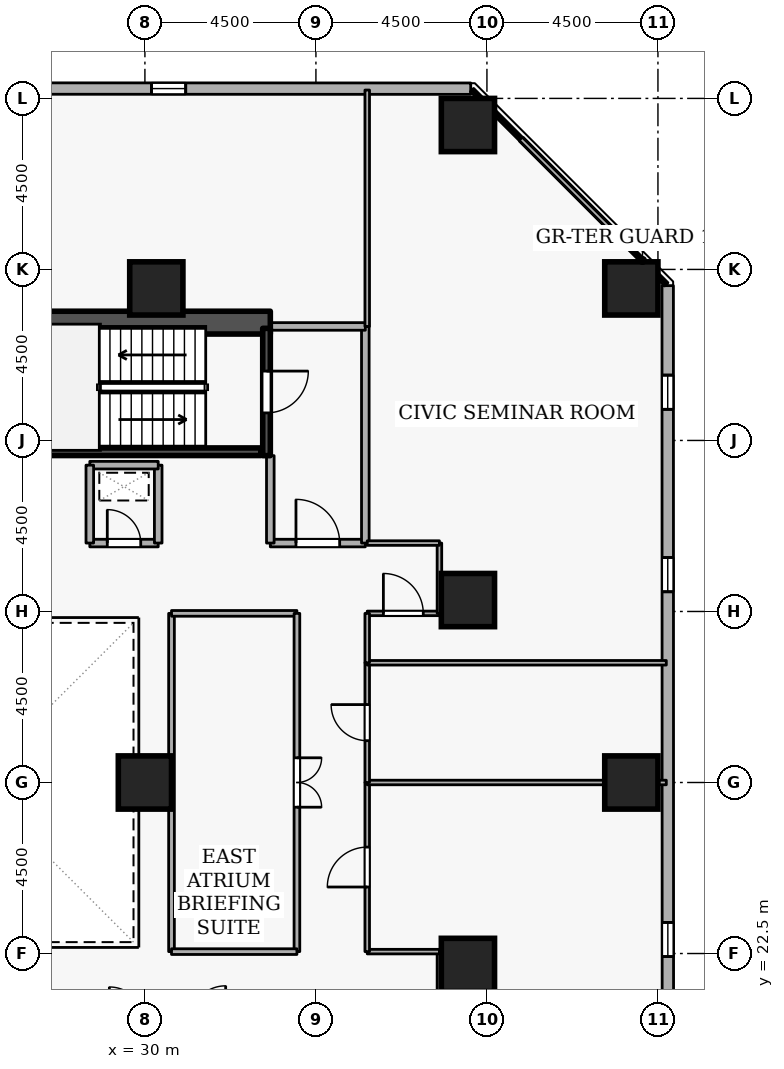
"""IFC4 building model, lengths in metres.
Left out: names, types, materials, properties, quantities, classifications, styles, units other than length and angle.
Written with IfcOpenShell. Run it as: python <this file> out.ifc"""

import sys

from ifc_helpers import new_model, si_unit, direction, frame, frame_2d, origin, origin_2d, place, context, subcontext, project, spatial, rectangle, extrude, element, fill, save


model = new_model("IFC4")
c1 = context("Model", 3, precision=1e-05, world=origin(), true_north=direction((0.0, 1.0)))
c2 = subcontext(c1, "Body", "Model", "MODEL_VIEW")
j1 = project(units=[si_unit("LENGTHUNIT", "METRE"), si_unit("PLANEANGLEUNIT", "RADIAN")], contexts=[c1])
p1 = place(None, origin())
s1 = spatial("IfcSite", under=j1, at=p1, CompositionType="ELEMENT")
p2 = place(p1, origin())
s2 = spatial("IfcBuilding", under=s1, at=p2, CompositionType="ELEMENT")
p3 = place(p2, frame((0.0, 0.0, 38.7)))
s3 = spatial("IfcBuildingStorey", under=s2, at=p3, CompositionType="ELEMENT", Elevation=38.7)
p4 = place(p3, frame((17.7, 39.1, 0.0), z_axis=(0.0, 0.0, 1.0), x_axis=(1.0, 0.0, 0.0)))
e1 = element("IfcWall", 1, at=p4, inside=s3, PredefinedType="SHEAR", context=c2, shape_type="SweptSolid", body=[
    extrude(rectangle(XDim=15.6, YDim=0.6, at=frame_2d((7.8, 0.0))), origin(), (0.0, 0.0, 1.0), 3.6),
])
for number, where, z_axis, x_axis in (
    (2, (42.8, 27.0, 0.0), (0.0, 0.0, 1.0), (1.0, 0.0, 0.0)),
    (3, (42.8, 40.0, 0.0), (0.0, 0.0, 1.0), (1.0, 0.0, 0.0)),
    (4, (38.5, 44.3, 0.0), (0.0, 0.0, 1.0), (1.0, 0.0, 0.0)),
    (5, (38.5, 22.2, 0.0), (0.0, 0.0, 1.0), (1.0, 0.0, 0.0)),
    (6, (38.5, 31.8, 0.0), (0.0, 0.0, 1.0), (1.0, 0.0, 0.0)),
    (7, (30.3, 40.0, 0.0), (0.0, 0.0, 1.0), (1.0, 0.0, 0.0)),
    (8, (30.0, 27.0, 0.0), (0.0, 0.0, 1.0), (1.0, 0.0, 0.0)),
):
    element("IfcColumn", number, at=place(p3, frame(where, z_axis=z_axis, x_axis=x_axis)), inside=s3, PredefinedType="COLUMN", context=c2, shape_type="SweptSolid", body=[
        extrude(rectangle(XDim=1.4, YDim=1.4, at=origin_2d()), origin(), (0.0, 0.0, 1.0), 3.6),
    ])
p5 = place(p3, frame((43.765, 5.319, 0.0), z_axis=(0.0, 0.0, 1.0), x_axis=(-0.000245864205, 0.999999969775, 0.0)))
e9 = element("IfcWall", 9, at=p5, inside=s3, PredefinedType="STANDARD", context=c2, shape_type="SweptSolid", body=[
    extrude(rectangle(XDim=34.755, YDim=0.3, at=frame_2d((17.377, 0.0))), origin(), (0.0, 0.0, 1.0), 2.7),
])
p6 = place(p5, frame((2.7, 0.0, 0.72)))
e10 = element("IfcOpeningElement", 10, at=p6, cuts=e9, PredefinedType="OPENING", context=c2, shape_type="SweptSolid", body=[
    extrude(rectangle(XDim=0.9, YDim=1.75, at=frame_2d((0.45, 0.875))), frame((0.0, 0.16, 0.0), z_axis=(0.0, -1.0, 0.0), x_axis=(1.0, 0.0, 0.0)), (0.0, 0.0, 1.0), 0.32),
])
p7 = place(p5, frame((12.3, 0.0, 0.72)))
e11 = element("IfcOpeningElement", 11, at=p7, cuts=e9, PredefinedType="OPENING", context=c2, shape_type="SweptSolid", body=[
    extrude(rectangle(XDim=0.9, YDim=1.75, at=frame_2d((0.45, 0.875))), frame((0.0, 0.16, 0.0), z_axis=(0.0, -1.0, 0.0), x_axis=(1.0, 0.0, 0.0)), (0.0, 0.0, 1.0), 0.32),
])
p8 = place(p5, frame((17.1, 0.0, 0.72)))
e12 = element("IfcOpeningElement", 12, at=p8, cuts=e9, PredefinedType="OPENING", context=c2, shape_type="SweptSolid", body=[
    extrude(rectangle(XDim=0.9, YDim=1.75, at=frame_2d((0.45, 0.875))), frame((0.0, 0.16, 0.0), z_axis=(0.0, -1.0, 0.0), x_axis=(1.0, 0.0, 0.0)), (0.0, 0.0, 1.0), 0.32),
])
p9 = place(p5, frame((26.7, 0.0, 0.72)))
e13 = element("IfcOpeningElement", 13, at=p9, cuts=e9, PredefinedType="OPENING", context=c2, shape_type="SweptSolid", body=[
    extrude(rectangle(XDim=0.9, YDim=1.75, at=frame_2d((0.45, 0.875))), frame((0.0, 0.16, 0.0), z_axis=(0.0, -1.0, 0.0), x_axis=(1.0, 0.0, 0.0)), (0.0, 0.0, 1.0), 0.32),
])
p10 = place(p5, frame((31.5, 0.0, 0.72)))
e14 = element("IfcOpeningElement", 14, at=p10, cuts=e9, PredefinedType="OPENING", context=c2, shape_type="SweptSolid", body=[
    extrude(rectangle(XDim=0.9, YDim=1.75, at=frame_2d((0.45, 0.875))), frame((0.0, 0.16, 0.0), z_axis=(0.0, -1.0, 0.0), x_axis=(1.0, 0.0, 0.0)), (0.0, 0.0, 1.0), 0.32),
])
p11 = place(p3, frame((38.573, 45.256, 0.0), z_axis=(0.0, 0.0, 1.0), x_axis=(-0.999999969775, 0.000245864205, 0.0)))
e15 = element("IfcWall", 15, at=p11, inside=s3, PredefinedType="STANDARD", context=c2, shape_type="SweptSolid", body=[
    extrude(rectangle(XDim=34.755, YDim=0.3, at=frame_2d((17.377, 0.0))), origin(), (0.0, 0.0, 1.0), 2.7),
])
p12 = place(p11, frame((7.5, 0.0, 0.72)))
e16 = element("IfcOpeningElement", 16, at=p12, cuts=e15, PredefinedType="OPENING", context=c2, shape_type="SweptSolid", body=[
    extrude(rectangle(XDim=0.9, YDim=1.75, at=frame_2d((0.45, 0.875))), frame((0.0, 0.16, 0.0), z_axis=(0.0, -1.0, 0.0), x_axis=(1.0, 0.0, 0.0)), (0.0, 0.0, 1.0), 0.32),
])
p13 = place(p11, frame((17.1, 0.0, 0.72)))
e17 = element("IfcOpeningElement", 17, at=p13, cuts=e15, PredefinedType="OPENING", context=c2, shape_type="SweptSolid", body=[
    extrude(rectangle(XDim=0.9, YDim=1.75, at=frame_2d((0.45, 0.875))), frame((0.0, 0.16, 0.0), z_axis=(0.0, -1.0, 0.0), x_axis=(1.0, 0.0, 0.0)), (0.0, 0.0, 1.0), 0.32),
])
p14 = place(p11, frame((21.9, 0.0, 0.72)))
e18 = element("IfcOpeningElement", 18, at=p14, cuts=e15, PredefinedType="OPENING", context=c2, shape_type="SweptSolid", body=[
    extrude(rectangle(XDim=0.9, YDim=1.75, at=frame_2d((0.45, 0.875))), frame((0.0, 0.16, 0.0), z_axis=(0.0, -1.0, 0.0), x_axis=(1.0, 0.0, 0.0)), (0.0, 0.0, 1.0), 0.32),
])
p15 = place(p11, frame((31.5, 0.0, 0.72)))
e19 = element("IfcOpeningElement", 19, at=p15, cuts=e15, PredefinedType="OPENING", context=c2, shape_type="SweptSolid", body=[
    extrude(rectangle(XDim=0.9, YDim=1.75, at=frame_2d((0.45, 0.875))), frame((0.0, 0.16, 0.0), z_axis=(0.0, -1.0, 0.0), x_axis=(1.0, 0.0, 0.0)), (0.0, 0.0, 1.0), 0.32),
])
p16 = place(p3, frame((33.2, 38.95, 0.0), z_axis=(0.0, 0.0, 1.0), x_axis=(0.0, -1.0, 0.0)))
e20 = element("IfcWall", 20, at=p16, inside=s3, PredefinedType="SHEAR", context=c2, shape_type="SweptSolid", body=[
    extrude(rectangle(XDim=3.35, YDim=0.2, at=frame_2d((1.675, 0.0))), origin(), (0.0, 0.0, 1.0), 3.6),
])
p17 = place(p16, frame((1.125, 0.0, 0.0)))
e21 = element("IfcOpeningElement", 21, at=p17, cuts=e20, PredefinedType="OPENING", context=c2, shape_type="SweptSolid", body=[
    extrude(rectangle(XDim=1.1, YDim=2.1, at=frame_2d((0.55, 1.05))), frame((0.0, 0.11, 0.0), z_axis=(0.0, -1.0, 0.0), x_axis=(1.0, 0.0, 0.0)), (0.0, 0.0, 1.0), 0.22),
])
p18 = place(p3, frame((25.95, 35.703, 0.0), z_axis=(0.0, 0.0, 1.0), x_axis=(1.0, 0.0, 0.0)))
e22 = element("IfcWall", 22, at=p18, inside=s3, PredefinedType="SHEAR", context=c2, shape_type="SweptSolid", body=[
    extrude(rectangle(XDim=7.1, YDim=0.2, at=frame_2d((3.55, 0.0))), origin(), (0.0, 0.0, 1.0), 3.6),
])
p19 = place(p3, frame((33.3, 33.3, 0.0), z_axis=(0.0, 0.0, 1.0), x_axis=(1.0, 0.0, 0.0)))
e23 = element("IfcWall", 23, at=p19, inside=s3, PredefinedType="STANDARD", context=c2, shape_type="SweptSolid", body=[
    extrude(rectangle(XDim=2.5, YDim=0.2, at=frame_2d((1.25, 0.0))), origin(), (0.0, 0.0, 1.0), 3.34),
])
p20 = place(p19, frame((0.675, 0.0, 0.0)))
e24 = element("IfcOpeningElement", 24, at=p20, cuts=e23, PredefinedType="OPENING", context=c2, shape_type="SweptSolid", body=[
    extrude(rectangle(XDim=1.15, YDim=2.1, at=frame_2d((0.575, 1.05))), frame((0.0, 0.11, 0.0), z_axis=(0.0, -1.0, 0.0), x_axis=(1.0, 0.0, 0.0)), (0.0, 0.0, 1.0), 0.22),
])
p21 = place(p3, frame((35.8, 33.3, 0.0), z_axis=(0.0, 0.0, 1.0), x_axis=(0.0, 1.0, 0.0)))
e25 = element("IfcWall", 25, at=p21, inside=s3, PredefinedType="STANDARD", context=c2, shape_type="SweptSolid", body=[
    extrude(rectangle(XDim=5.7, YDim=0.2, at=frame_2d((2.85, 0.0))), origin(), (0.0, 0.0, 1.0), 3.34),
])
p22 = place(p3, frame((35.8, 39.0, 0.0), z_axis=(0.0, 0.0, 1.0), x_axis=(-1.0, 0.0, 0.0)))
e26 = element("IfcWall", 26, at=p22, inside=s3, PredefinedType="STANDARD", context=c2, shape_type="SweptSolid", body=[
    extrude(rectangle(XDim=2.5, YDim=0.2, at=frame_2d((1.25, 0.0))), origin(), (0.0, 0.0, 1.0), 3.34),
])
p23 = place(p3, frame((33.3, 35.6, 0.0), z_axis=(0.0, 0.0, 1.0), x_axis=(0.0, -1.0, 0.0)))
e27 = element("IfcWall", 27, at=p23, inside=s3, PredefinedType="STANDARD", context=c2, shape_type="SweptSolid", body=[
    extrude(rectangle(XDim=2.3, YDim=0.2, at=frame_2d((1.15, 0.0))), origin(), (0.0, 0.0, 1.0), 2.545),
])
p24 = place(p3, frame((28.55, 33.3, 0.0), z_axis=(0.0, 0.0, 1.0), x_axis=(1.0, 0.0, 0.0)))
e28 = element("IfcWall", 28, at=p24, inside=s3, PredefinedType="STANDARD", context=c2, shape_type="SweptSolid", body=[
    extrude(rectangle(XDim=1.8, YDim=0.2, at=frame_2d((0.9, 0.0))), origin(), (0.0, 0.0, 1.0), 3.34),
])
p25 = place(p24, frame((0.46, 0.0, 0.0)))
e29 = element("IfcOpeningElement", 29, at=p25, cuts=e28, PredefinedType="OPENING", context=c2, shape_type="SweptSolid", body=[
    extrude(rectangle(XDim=0.88, YDim=2.04, at=frame_2d((0.44, 1.02))), frame((0.0, 0.11, 0.0), z_axis=(0.0, -1.0, 0.0), x_axis=(1.0, 0.0, 0.0)), (0.0, 0.0, 1.0), 0.22),
])
p26 = place(p3, frame((30.35, 33.3, 0.0), z_axis=(0.0, 0.0, 1.0), x_axis=(0.0, 1.0, 0.0)))
e30 = element("IfcWall", 30, at=p26, inside=s3, PredefinedType="STANDARD", context=c2, shape_type="SweptSolid", body=[
    extrude(rectangle(XDim=2.05, YDim=0.2, at=frame_2d((1.025, 0.0))), origin(), (0.0, 0.0, 1.0), 3.34),
])
p27 = place(p3, frame((30.35, 35.35, 0.0), z_axis=(0.0, 0.0, 1.0), x_axis=(-1.0, 0.0, 0.0)))
e31 = element("IfcWall", 31, at=p27, inside=s3, PredefinedType="STANDARD", context=c2, shape_type="SweptSolid", body=[
    extrude(rectangle(XDim=1.8, YDim=0.2, at=frame_2d((0.9, 0.0))), origin(), (0.0, 0.0, 1.0), 3.34),
])
p28 = place(p3, frame((28.55, 35.35, 0.0), z_axis=(0.0, 0.0, 1.0), x_axis=(0.0, -1.0, 0.0)))
e32 = element("IfcWall", 32, at=p28, inside=s3, PredefinedType="STANDARD", context=c2, shape_type="SweptSolid", body=[
    extrude(rectangle(XDim=2.05, YDim=0.2, at=frame_2d((1.025, 0.0))), origin(), (0.0, 0.0, 1.0), 3.34),
])
p29 = place(p3, frame((37.75, 20.7, 0.0), z_axis=(0.0, 0.0, 1.0), x_axis=(0.0, 1.0, 0.0)))
e33 = element("IfcWall", 33, at=p29, inside=s3, PredefinedType="PARTITIONING", context=c2, shape_type="SweptSolid", body=[
    extrude(rectangle(XDim=1.85, YDim=0.12, at=frame_2d((0.925, 0.0))), origin(), (0.0, 0.0, 1.0), 3.34),
])
p30 = place(p3, frame((37.75, 22.55, 0.0), z_axis=(0.0, 0.0, 1.0), x_axis=(-1.0, 0.0, 0.0)))
e34 = element("IfcWall", 34, at=p30, inside=s3, PredefinedType="PARTITIONING", context=c2, shape_type="SweptSolid", body=[
    extrude(rectangle(XDim=1.9, YDim=0.12, at=frame_2d((0.95, 0.0))), origin(), (0.0, 0.0, 1.0), 3.34),
])
p31 = place(p3, frame((35.85, 22.55, 0.0), z_axis=(0.0, 0.0, 1.0), x_axis=(0.0, 1.0, 0.0)))
e35 = element("IfcWall", 35, at=p31, inside=s3, PredefinedType="PARTITIONING", context=c2, shape_type="SweptSolid", body=[
    extrude(rectangle(XDim=4.45, YDim=0.12, at=frame_2d((2.225, 0.0))), origin(), (0.0, 0.0, 1.0), 3.34),
])
p32 = place(p31, frame((1.7, 0.0, 0.0)))
e36 = element("IfcOpeningElement", 36, at=p32, cuts=e35, PredefinedType="OPENING", context=c2, shape_type="SweptSolid", body=[
    extrude(rectangle(XDim=1.05, YDim=2.1, at=frame_2d((0.525, 1.05))), frame((0.0, 0.07, 0.0), z_axis=(0.0, -1.0, 0.0), x_axis=(1.0, 0.0, 0.0)), (0.0, 0.0, 1.0), 0.14),
])
p33 = place(p3, frame((35.85, 27.0, 0.0), z_axis=(0.0, 0.0, 1.0), x_axis=(1.0, 0.0, 0.0)))
e37 = element("IfcWall", 37, at=p33, inside=s3, PredefinedType="PARTITIONING", context=c2, shape_type="SweptSolid", body=[
    extrude(rectangle(XDim=7.87, YDim=0.12, at=frame_2d((3.935, 0.0))), origin(), (0.0, 0.0, 1.0), 2.882),
])
p34 = place(p3, frame((35.85, 27.0, 0.0), z_axis=(0.0, 0.0, 1.0), x_axis=(0.0, 1.0, 0.0)))
e38 = element("IfcWall", 38, at=p34, inside=s3, PredefinedType="PARTITIONING", context=c2, shape_type="SweptSolid", body=[
    extrude(rectangle(XDim=3.15, YDim=0.12, at=frame_2d((1.575, 0.0))), origin(), (0.0, 0.0, 1.0), 3.34),
])
p35 = place(p34, frame((1.1, 0.0, 0.0)))
e39 = element("IfcOpeningElement", 39, at=p35, cuts=e38, PredefinedType="OPENING", context=c2, shape_type="SweptSolid", body=[
    extrude(rectangle(XDim=0.95, YDim=2.1, at=frame_2d((0.475, 1.05))), frame((0.0, 0.07, 0.0), z_axis=(0.0, -1.0, 0.0), x_axis=(1.0, 0.0, 0.0)), (0.0, 0.0, 1.0), 0.14),
])
p36 = place(p3, frame((35.85, 30.15, 0.0), z_axis=(0.0, 0.0, 1.0), x_axis=(1.0, 0.0, 0.0)))
e40 = element("IfcWall", 40, at=p36, inside=s3, PredefinedType="PARTITIONING", context=c2, shape_type="SweptSolid", body=[
    extrude(rectangle(XDim=7.87, YDim=0.12, at=frame_2d((3.935, 0.0))), origin(), (0.0, 0.0, 1.0), 3.34),
])
p37 = place(p3, frame((35.85, 31.45, 0.0), z_axis=(0.0, 0.0, 1.0), x_axis=(1.0, 0.0, 0.0)))
e41 = element("IfcWall", 41, at=p37, inside=s3, PredefinedType="PARTITIONING", context=c2, shape_type="SweptSolid", body=[
    extrude(rectangle(XDim=1.9, YDim=0.12, at=frame_2d((0.95, 0.0))), origin(), (0.0, 0.0, 1.0), 3.34),
])
p38 = place(p37, frame((0.425, 0.0, 0.0)))
e42 = element("IfcOpeningElement", 42, at=p38, cuts=e41, PredefinedType="OPENING", context=c2, shape_type="SweptSolid", body=[
    extrude(rectangle(XDim=1.05, YDim=2.1, at=frame_2d((0.525, 1.05))), frame((0.0, 0.07, 0.0), z_axis=(0.0, -1.0, 0.0), x_axis=(1.0, 0.0, 0.0)), (0.0, 0.0, 1.0), 0.14),
])
p39 = place(p3, frame((37.75, 31.45, 0.0), z_axis=(0.0, 0.0, 1.0), x_axis=(0.0, 1.0, 0.0)))
e43 = element("IfcWall", 43, at=p39, inside=s3, PredefinedType="PARTITIONING", context=c2, shape_type="SweptSolid", body=[
    extrude(rectangle(XDim=1.85, YDim=0.12, at=frame_2d((0.925, 0.0))), origin(), (0.0, 0.0, 1.0), 3.34),
])
p40 = place(p3, frame((37.75, 33.3, 0.0), z_axis=(0.0, 0.0, 1.0), x_axis=(-1.0, 0.0, 0.0)))
e44 = element("IfcWall", 44, at=p40, inside=s3, PredefinedType="PARTITIONING", context=c2, shape_type="SweptSolid", body=[
    extrude(rectangle(XDim=1.9, YDim=0.12, at=frame_2d((0.95, 0.0))), origin(), (0.0, 0.0, 1.0), 3.34),
])
p41 = place(p3, frame((35.85, 39.0, 0.0), z_axis=(0.0, 0.0, 1.0), x_axis=(0.0, 1.0, 0.0)))
e45 = element("IfcWall", 45, at=p41, inside=s3, PredefinedType="PARTITIONING", context=c2, shape_type="SweptSolid", body=[
    extrude(rectangle(XDim=6.22, YDim=0.12, at=frame_2d((3.11, 0.0))), origin(), (0.0, 0.0, 1.0), 3.34),
])
p42 = place(p3, frame((38.607, 45.22, 0.0), z_axis=(0.0, 0.0, 1.0), x_axis=(0.707106781187, -0.707106781187, 0.0)))
e46 = element("IfcWall", 46, at=p42, inside=s3, PredefinedType="PARTITIONING", context=c2, shape_type="SweptSolid", body=[
    extrude(rectangle(XDim=7.23, YDim=0.12, at=frame_2d((3.615, 0.0))), origin(), (0.0, 0.0, 1.0), 3.34),
])
p43 = place(p3, frame((35.85, 30.15, 0.0), z_axis=(0.0, 0.0, 1.0), x_axis=(0.0, 1.0, 0.0)))
e47 = element("IfcWall", 47, at=p43, inside=s3, PredefinedType="PARTITIONING", context=c2, shape_type="SweptSolid", body=[
    extrude(rectangle(XDim=1.3, YDim=0.12, at=frame_2d((0.65, 0.0))), origin(), (0.0, 0.0, 1.0), 3.34),
])
p44 = place(p3, frame((30.7, 22.55, 0.0), z_axis=(0.0, 0.0, 1.0), x_axis=(0.0, 1.0, 0.0)))
e48 = element("IfcWall", 48, at=p44, inside=s3, PredefinedType="PARTITIONING", context=c2, shape_type="SweptSolid", body=[
    extrude(rectangle(XDim=8.9, YDim=0.15, at=frame_2d((4.45, 0.0))), origin(), (0.0, 0.0, 1.0), 3.34),
])
p45 = place(p3, frame((30.7, 31.45, 0.0), z_axis=(0.0, 0.0, 1.0), x_axis=(1.0, 0.0, 0.0)))
e49 = element("IfcWall", 49, at=p45, inside=s3, PredefinedType="PARTITIONING", context=c2, shape_type="SweptSolid", body=[
    extrude(rectangle(XDim=3.3, YDim=0.15, at=frame_2d((1.65, 0.0))), origin(), (0.0, 0.0, 1.0), 3.34),
])
p46 = place(p3, frame((34.0, 31.45, 0.0), z_axis=(0.0, 0.0, 1.0), x_axis=(0.0, -1.0, 0.0)))
e50 = element("IfcWall", 50, at=p46, inside=s3, PredefinedType="PARTITIONING", context=c2, shape_type="SweptSolid", body=[
    extrude(rectangle(XDim=8.9, YDim=0.15, at=frame_2d((4.45, 0.0))), origin(), (0.0, 0.0, 1.0), 3.34),
])
p47 = place(p46, frame((3.8, 0.0, 0.0)))
e51 = element("IfcOpeningElement", 51, at=p47, cuts=e50, PredefinedType="OPENING", context=c2, shape_type="SweptSolid", body=[
    extrude(rectangle(XDim=1.3, YDim=2.12, at=frame_2d((0.65, 1.06))), frame((0.0, 0.085, 0.0), z_axis=(0.0, -1.0, 0.0), x_axis=(1.0, 0.0, 0.0)), (0.0, 0.0, 1.0), 0.17),
])
p48 = place(p3, frame((34.0, 22.55, 0.0), z_axis=(0.0, 0.0, 1.0), x_axis=(-1.0, 0.0, 0.0)))
e52 = element("IfcWall", 52, at=p48, inside=s3, PredefinedType="PARTITIONING", context=c2, shape_type="SweptSolid", body=[
    extrude(rectangle(XDim=3.3, YDim=0.15, at=frame_2d((1.65, 0.0))), origin(), (0.0, 0.0, 1.0), 3.34),
])
p49 = place(p8, origin())
e53 = element("IfcWindow", 53, at=p49, inside=s3, PartitioningType="SINGLE_PANEL", PredefinedType="WINDOW", context=c2, shape_type="SweptSolid", body=[
    extrude(rectangle(XDim=0.9, YDim=1.75, at=frame_2d((0.45, 0.875))), frame((0.0, 0.03, 0.0), z_axis=(0.0, -1.0, 0.0), x_axis=(1.0, 0.0, 0.0)), (0.0, 0.0, 1.0), 0.06),
])
fill(e12, e53)
p50 = place(p9, origin())
e54 = element("IfcWindow", 54, at=p50, inside=s3, PartitioningType="SINGLE_PANEL", PredefinedType="WINDOW", context=c2, shape_type="SweptSolid", body=[
    extrude(rectangle(XDim=0.9, YDim=1.75, at=frame_2d((0.45, 0.875))), frame((0.0, 0.03, 0.0), z_axis=(0.0, -1.0, 0.0), x_axis=(1.0, 0.0, 0.0)), (0.0, 0.0, 1.0), 0.06),
])
fill(e13, e54)
p51 = place(p10, origin())
e55 = element("IfcWindow", 55, at=p51, inside=s3, PartitioningType="SINGLE_PANEL", PredefinedType="WINDOW", context=c2, shape_type="SweptSolid", body=[
    extrude(rectangle(XDim=0.9, YDim=1.75, at=frame_2d((0.45, 0.875))), frame((0.0, 0.03, 0.0), z_axis=(0.0, -1.0, 0.0), x_axis=(1.0, 0.0, 0.0)), (0.0, 0.0, 1.0), 0.06),
])
fill(e14, e55)
p52 = place(p12, origin())
e56 = element("IfcWindow", 56, at=p52, inside=s3, PartitioningType="SINGLE_PANEL", PredefinedType="WINDOW", context=c2, shape_type="SweptSolid", body=[
    extrude(rectangle(XDim=0.9, YDim=1.75, at=frame_2d((0.45, 0.875))), frame((0.0, 0.03, 0.0), z_axis=(0.0, -1.0, 0.0), x_axis=(1.0, 0.0, 0.0)), (0.0, 0.0, 1.0), 0.06),
])
fill(e16, e56)
p53 = place(p17, origin())
e57 = element("IfcDoor", 57, at=p53, inside=s3, OperationType="SINGLE_SWING_LEFT", PredefinedType="DOOR", context=c2, shape_type="SweptSolid", body=[
    extrude(rectangle(XDim=1.1, YDim=2.1, at=frame_2d((0.55, 1.05))), frame((0.0, 0.025, 0.0), z_axis=(0.0, -1.0, 0.0), x_axis=(1.0, 0.0, 0.0)), (0.0, 0.0, 1.0), 0.05),
])
fill(e21, e57)
p54 = place(p20, origin())
e58 = element("IfcDoor", 58, at=p54, inside=s3, OperationType="SINGLE_SWING_LEFT", PredefinedType="DOOR", context=c2, shape_type="SweptSolid", body=[
    extrude(rectangle(XDim=1.15, YDim=2.1, at=frame_2d((0.575, 1.05))), frame((0.0, 0.025, 0.0), z_axis=(0.0, -1.0, 0.0), x_axis=(1.0, 0.0, 0.0)), (0.0, 0.0, 1.0), 0.05),
])
fill(e24, e58)
p55 = place(p25, origin())
e59 = element("IfcDoor", 59, at=p55, inside=s3, OperationType="SINGLE_SWING_LEFT", PredefinedType="DOOR", context=c2, shape_type="SweptSolid", body=[
    extrude(rectangle(XDim=0.88, YDim=2.04, at=frame_2d((0.44, 1.02))), frame((0.0, 0.025, 0.0), z_axis=(0.0, -1.0, 0.0), x_axis=(1.0, 0.0, 0.0)), (0.0, 0.0, 1.0), 0.05),
])
fill(e29, e59)
p56 = place(p32, origin())
e60 = element("IfcDoor", 60, at=p56, inside=s3, OperationType="SINGLE_SWING_LEFT", PredefinedType="DOOR", context=c2, shape_type="SweptSolid", body=[
    extrude(rectangle(XDim=1.05, YDim=2.1, at=frame_2d((0.525, 1.05))), frame((0.0, 0.025, 0.0), z_axis=(0.0, -1.0, 0.0), x_axis=(1.0, 0.0, 0.0)), (0.0, 0.0, 1.0), 0.05),
])
fill(e36, e60)
p57 = place(p35, origin())
e61 = element("IfcDoor", 61, at=p57, inside=s3, OperationType="SINGLE_SWING_RIGHT", PredefinedType="DOOR", context=c2, shape_type="SweptSolid", body=[
    extrude(rectangle(XDim=0.95, YDim=2.1, at=frame_2d((0.475, 1.05))), frame((0.0, 0.025, 0.0), z_axis=(0.0, -1.0, 0.0), x_axis=(1.0, 0.0, 0.0)), (0.0, 0.0, 1.0), 0.05),
])
fill(e39, e61)
p58 = place(p38, origin())
e62 = element("IfcDoor", 62, at=p58, inside=s3, OperationType="SINGLE_SWING_LEFT", PredefinedType="DOOR", context=c2, shape_type="SweptSolid", body=[
    extrude(rectangle(XDim=1.05, YDim=2.1, at=frame_2d((0.525, 1.05))), frame((0.0, 0.025, 0.0), z_axis=(0.0, -1.0, 0.0), x_axis=(1.0, 0.0, 0.0)), (0.0, 0.0, 1.0), 0.05),
])
fill(e42, e62)
p59 = place(p47, origin())
e63 = element("IfcDoor", 63, at=p59, inside=s3, OperationType="DOUBLE_DOOR_SINGLE_SWING", PredefinedType="DOOR", context=c2, shape_type="SweptSolid", body=[
    extrude(rectangle(XDim=1.3, YDim=2.12, at=frame_2d((0.65, 1.06))), frame((0.0, 0.025, 0.0), z_axis=(0.0, -1.0, 0.0), x_axis=(1.0, 0.0, 0.0)), (0.0, 0.0, 1.0), 0.05),
])
fill(e51, e63)
save(model, sys.argv[1])
